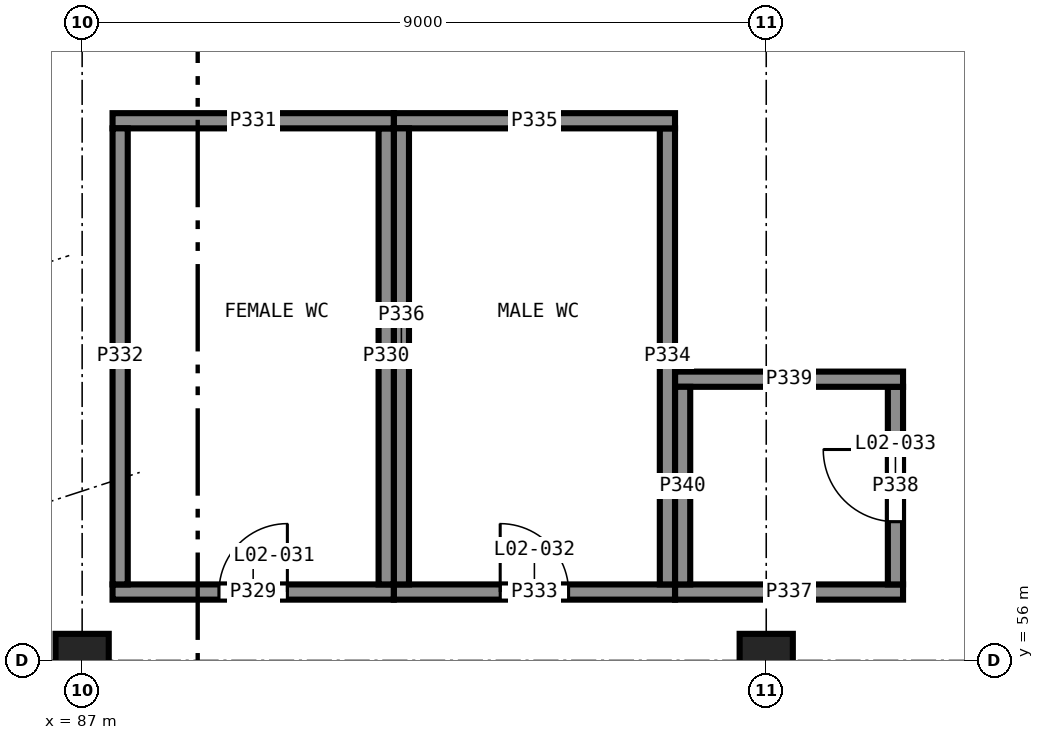
"""IFC4 building model, lengths in metres.
Left out: names, types, materials, properties, quantities, classifications, styles, units other than length and angle.
Written with IfcOpenShell. Run it as: python <this file> out.ifc"""

import sys

from ifc_helpers import new_model, si_unit, direction, frame, frame_2d, origin, origin_2d, place, context, subcontext, project, spatial, rectangle, extrude, element, fill, save


model = new_model("IFC4")
c1 = context("Model", 3, precision=1e-05, world=origin(), true_north=direction((0.0, 1.0)))
c2 = subcontext(c1, "Body", "Model", "MODEL_VIEW")
j1 = project(units=[si_unit("LENGTHUNIT", "METRE"), si_unit("PLANEANGLEUNIT", "RADIAN")], contexts=[c1])
p1 = place(None, origin())
s1 = spatial("IfcSite", under=j1, at=p1, CompositionType="ELEMENT")
p2 = place(p1, origin())
s2 = spatial("IfcBuilding", under=s1, at=p2, CompositionType="ELEMENT")
p3 = place(p2, frame((0.0, 0.0, 9.5)))
s3 = spatial("IfcBuildingStorey", under=s2, at=p3, CompositionType="ELEMENT", Elevation=9.5)
for number, where, z_axis, x_axis in (
    (1, (87.0, 56.0, 0.0), (0.0, 0.0, 1.0), (1.0, 0.0, 0.0)),
    (2, (96.0, 56.0, 0.0), (0.0, 0.0, 1.0), (1.0, 0.0, 0.0)),
):
    element("IfcColumn", number, at=place(p3, frame(where, z_axis=z_axis, x_axis=x_axis)), inside=s3, PredefinedType="COLUMN", context=c2, shape_type="SweptSolid", body=[
        extrude(rectangle(XDim=0.7, YDim=0.7, at=origin_2d()), origin(), (0.0, 0.0, 1.0), 4.0),
    ])
p4 = place(p3, frame((87.4, 56.9, 0.0), z_axis=(0.0, 0.0, 1.0), x_axis=(1.0, 0.0, 0.0)))
e3 = element("IfcWall", 3, at=p4, inside=s3, PredefinedType="PARTITIONING", context=c2, shape_type="SweptSolid", body=[
    extrude(rectangle(XDim=3.7, YDim=0.2, at=frame_2d((1.85, 0.0))), origin(), (0.0, 0.0, 1.0), 3.7),
])
p5 = place(p4, frame((1.4, 0.0, 0.0)))
e4 = element("IfcOpeningElement", 4, at=p5, cuts=e3, PredefinedType="OPENING", context=c2, shape_type="SweptSolid", body=[
    extrude(rectangle(XDim=0.9, YDim=2.1, at=frame_2d((0.45, 1.05))), frame((0.0, 0.11, 0.0), z_axis=(0.0, -1.0, 0.0), x_axis=(1.0, 0.0, 0.0)), (0.0, 0.0, 1.0), 0.22),
])
p6 = place(p3, frame((91.0, 57.0, 0.0), z_axis=(0.0, 0.0, 1.0), x_axis=(0.0, 1.0, 0.0)))
e5 = element("IfcWall", 5, at=p6, inside=s3, PredefinedType="PARTITIONING", context=c2, shape_type="SweptSolid", body=[
    extrude(rectangle(XDim=6.0, YDim=0.2, at=frame_2d((3.0, 0.0))), origin(), (0.0, 0.0, 1.0), 3.7),
])
p7 = place(p3, frame((91.1, 63.1, 0.0), z_axis=(0.0, 0.0, 1.0), x_axis=(-1.0, 0.0, 0.0)))
e6 = element("IfcWall", 6, at=p7, inside=s3, PredefinedType="PARTITIONING", context=c2, shape_type="SweptSolid", body=[
    extrude(rectangle(XDim=3.7, YDim=0.2, at=frame_2d((1.85, 0.0))), origin(), (0.0, 0.0, 1.0), 3.7),
])
p8 = place(p3, frame((87.5, 63.0, 0.0), z_axis=(0.0, 0.0, 1.0), x_axis=(0.0, -1.0, 0.0)))
e7 = element("IfcWall", 7, at=p8, inside=s3, PredefinedType="PARTITIONING", context=c2, shape_type="SweptSolid", body=[
    extrude(rectangle(XDim=6.0, YDim=0.2, at=frame_2d((3.0, 0.0))), origin(), (0.0, 0.0, 1.0), 3.7),
])
p9 = place(p3, frame((91.1, 56.9, 0.0), z_axis=(0.0, 0.0, 1.0), x_axis=(1.0, 0.0, 0.0)))
e8 = element("IfcWall", 8, at=p9, inside=s3, PredefinedType="PARTITIONING", context=c2, shape_type="SweptSolid", body=[
    extrude(rectangle(XDim=3.7, YDim=0.2, at=frame_2d((1.85, 0.0))), origin(), (0.0, 0.0, 1.0), 3.7),
])
p10 = place(p9, frame((1.4, 0.0, 0.0)))
e9 = element("IfcOpeningElement", 9, at=p10, cuts=e8, PredefinedType="OPENING", context=c2, shape_type="SweptSolid", body=[
    extrude(rectangle(XDim=0.9, YDim=2.1, at=frame_2d((0.45, 1.05))), frame((0.0, 0.11, 0.0), z_axis=(0.0, -1.0, 0.0), x_axis=(1.0, 0.0, 0.0)), (0.0, 0.0, 1.0), 0.22),
])
p11 = place(p3, frame((94.7, 57.0, 0.0), z_axis=(0.0, 0.0, 1.0), x_axis=(0.0, 1.0, 0.0)))
e10 = element("IfcWall", 10, at=p11, inside=s3, PredefinedType="PARTITIONING", context=c2, shape_type="SweptSolid", body=[
    extrude(rectangle(XDim=6.0, YDim=0.2, at=frame_2d((3.0, 0.0))), origin(), (0.0, 0.0, 1.0), 3.7),
])
p12 = place(p3, frame((94.8, 63.1, 0.0), z_axis=(0.0, 0.0, 1.0), x_axis=(-1.0, 0.0, 0.0)))
e11 = element("IfcWall", 11, at=p12, inside=s3, PredefinedType="PARTITIONING", context=c2, shape_type="SweptSolid", body=[
    extrude(rectangle(XDim=3.7, YDim=0.2, at=frame_2d((1.85, 0.0))), origin(), (0.0, 0.0, 1.0), 3.7),
])
p13 = place(p3, frame((91.2, 63.0, 0.0), z_axis=(0.0, 0.0, 1.0), x_axis=(0.0, -1.0, 0.0)))
e12 = element("IfcWall", 12, at=p13, inside=s3, PredefinedType="PARTITIONING", context=c2, shape_type="SweptSolid", body=[
    extrude(rectangle(XDim=6.0, YDim=0.2, at=frame_2d((3.0, 0.0))), origin(), (0.0, 0.0, 1.0), 3.7),
])
p14 = place(p3, frame((94.8, 56.9, 0.0), z_axis=(0.0, 0.0, 1.0), x_axis=(1.0, 0.0, 0.0)))
e13 = element("IfcWall", 13, at=p14, inside=s3, PredefinedType="PARTITIONING", context=c2, shape_type="SweptSolid", body=[
    extrude(rectangle(XDim=3.0, YDim=0.2, at=frame_2d((1.5, 0.0))), origin(), (0.0, 0.0, 1.0), 3.7),
])
p15 = place(p3, frame((97.7, 57.0, 0.0), z_axis=(0.0, 0.0, 1.0), x_axis=(0.0, 1.0, 0.0)))
e14 = element("IfcWall", 14, at=p15, inside=s3, PredefinedType="PARTITIONING", context=c2, shape_type="SweptSolid", body=[
    extrude(rectangle(XDim=2.6, YDim=0.2, at=frame_2d((1.3, 0.0))), origin(), (0.0, 0.0, 1.0), 3.7),
])
p16 = place(p15, frame((0.825, 0.0, 0.0)))
e15 = element("IfcOpeningElement", 15, at=p16, cuts=e14, PredefinedType="OPENING", context=c2, shape_type="SweptSolid", body=[
    extrude(rectangle(XDim=0.95, YDim=2.1, at=frame_2d((0.475, 1.05))), frame((0.0, 0.11, 0.0), z_axis=(0.0, -1.0, 0.0), x_axis=(1.0, 0.0, 0.0)), (0.0, 0.0, 1.0), 0.22),
])
p17 = place(p3, frame((97.8, 59.7, 0.0), z_axis=(0.0, 0.0, 1.0), x_axis=(-1.0, 0.0, 0.0)))
e16 = element("IfcWall", 16, at=p17, inside=s3, PredefinedType="PARTITIONING", context=c2, shape_type="SweptSolid", body=[
    extrude(rectangle(XDim=3.0, YDim=0.2, at=frame_2d((1.5, 0.0))), origin(), (0.0, 0.0, 1.0), 3.7),
])
p18 = place(p3, frame((94.9, 59.6, 0.0), z_axis=(0.0, 0.0, 1.0), x_axis=(0.0, -1.0, 0.0)))
e17 = element("IfcWall", 17, at=p18, inside=s3, PredefinedType="PARTITIONING", context=c2, shape_type="SweptSolid", body=[
    extrude(rectangle(XDim=2.6, YDim=0.2, at=frame_2d((1.3, 0.0))), origin(), (0.0, 0.0, 1.0), 3.7),
])
p19 = place(p5, origin())
e18 = element("IfcDoor", 18, at=p19, inside=s3, OperationType="SINGLE_SWING_LEFT", PredefinedType="DOOR", context=c2, shape_type="SweptSolid", body=[
    extrude(rectangle(XDim=0.9, YDim=2.1, at=frame_2d((0.45, 1.05))), frame((0.0, 0.025, 0.0), z_axis=(0.0, -1.0, 0.0), x_axis=(1.0, 0.0, 0.0)), (0.0, 0.0, 1.0), 0.05),
])
fill(e4, e18)
p20 = place(p10, origin())
e19 = element("IfcDoor", 19, at=p20, inside=s3, OperationType="SINGLE_SWING_RIGHT", PredefinedType="DOOR", context=c2, shape_type="SweptSolid", body=[
    extrude(rectangle(XDim=0.9, YDim=2.1, at=frame_2d((0.45, 1.05))), frame((0.0, 0.025, 0.0), z_axis=(0.0, -1.0, 0.0), x_axis=(1.0, 0.0, 0.0)), (0.0, 0.0, 1.0), 0.05),
])
fill(e9, e19)
p21 = place(p16, origin())
e20 = element("IfcDoor", 20, at=p21, inside=s3, OperationType="SINGLE_SWING_LEFT", PredefinedType="DOOR", context=c2, shape_type="SweptSolid", body=[
    extrude(rectangle(XDim=0.95, YDim=2.1, at=frame_2d((0.475, 1.05))), frame((0.0, 0.025, 0.0), z_axis=(0.0, -1.0, 0.0), x_axis=(1.0, 0.0, 0.0)), (0.0, 0.0, 1.0), 0.05),
])
fill(e15, e20)
save(model, sys.argv[1])
